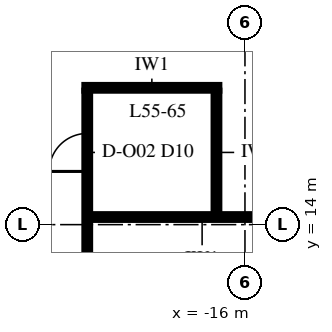
"""IFC4 building model, lengths in metres.
Left out: names, types, materials, properties, quantities, classifications, styles, units other than length and angle.
Written with IfcOpenShell. Run it as: python <this file> out.ifc"""

import sys

from ifc_helpers import new_model, si_unit, direction, frame, frame_2d, origin, place, context, subcontext, project, spatial, rectangle, extrude, element, fill, save


model = new_model("IFC4")
c1 = context("Model", 3, precision=1e-05, world=origin(), true_north=direction((0.0, 1.0)))
c2 = subcontext(c1, "Body", "Model", "MODEL_VIEW")
j1 = project(units=[si_unit("LENGTHUNIT", "METRE"), si_unit("PLANEANGLEUNIT", "RADIAN")], contexts=[c1])
p1 = place(None, origin())
s1 = spatial("IfcSite", under=j1, at=p1, CompositionType="ELEMENT")
p2 = place(p1, origin())
s2 = spatial("IfcBuilding", under=s1, at=p2, CompositionType="ELEMENT")
p3 = place(p2, frame((0.0, 0.0, 238.0)))
s3 = spatial("IfcBuildingStorey", under=s2, at=p3, CompositionType="ELEMENT", Elevation=238.0)
p4 = place(p3, frame((-20.075, 14.2, 0.0), z_axis=(0.0, 0.0, 1.0), x_axis=(1.0, 0.0, 0.0)))
e1 = element("IfcWall", 1, at=p4, inside=s3, PredefinedType="PARTITIONING", context=c2, shape_type="SweptSolid", body=[
    extrude(rectangle(XDim=5.895, YDim=0.15, at=frame_2d((2.948, 0.0))), origin(), (0.0, 0.0, 1.0), 3.13),
])
p5 = place(p3, frame((-20.225, 17.6, 0.0), z_axis=(0.0, 0.0, 1.0), x_axis=(1.0, 0.0, 0.0)))
e2 = element("IfcWall", 2, at=p5, inside=s3, PredefinedType="PARTITIONING", context=c2, shape_type="SweptSolid", body=[
    extrude(rectangle(XDim=3.55, YDim=0.15, at=frame_2d((1.775, 0.0))), origin(), (0.0, 0.0, 1.0), 3.75),
])
p6 = place(p3, frame((-20.15, 8.275, 0.0), z_axis=(0.0, 0.0, 1.0), x_axis=(0.0, 1.0, 0.0)))
e3 = element("IfcWall", 3, at=p6, inside=s3, PredefinedType="PARTITIONING", context=c2, shape_type="SweptSolid", body=[
    extrude(rectangle(XDim=9.25, YDim=0.15, at=frame_2d((4.625, 0.0))), origin(), (0.0, 0.0, 1.0), 3.13),
])
p7 = place(p6, frame((2.425, 0.0, 0.0)))
e4 = element("IfcOpeningElement", 4, at=p7, cuts=e3, PredefinedType="OPENING", context=c2, shape_type="SweptSolid", body=[
    extrude(rectangle(XDim=1.0, YDim=2.3, at=frame_2d((0.5, 1.15))), frame((0.0, 0.09, 0.0), z_axis=(0.0, -1.0, 0.0), x_axis=(1.0, 0.0, 0.0)), (0.0, 0.0, 1.0), 0.18),
])
p8 = place(p6, frame((7.125, 0.0, 0.0)))
e5 = element("IfcOpeningElement", 5, at=p8, cuts=e3, PredefinedType="OPENING", context=c2, shape_type="SweptSolid", body=[
    extrude(rectangle(XDim=1.0, YDim=2.3, at=frame_2d((0.5, 1.15))), frame((0.0, 0.09, 0.0), z_axis=(0.0, -1.0, 0.0), x_axis=(1.0, 0.0, 0.0)), (0.0, 0.0, 1.0), 0.18),
])
p9 = place(p3, frame((-16.75, 14.275, 0.0), z_axis=(0.0, 0.0, 1.0), x_axis=(0.0, 1.0, 0.0)))
e6 = element("IfcWall", 6, at=p9, inside=s3, PredefinedType="PARTITIONING", context=c2, shape_type="SweptSolid", body=[
    extrude(rectangle(XDim=3.25, YDim=0.15, at=frame_2d((1.625, 0.0))), origin(), (0.0, 0.0, 1.0), 3.13),
])
p10 = place(p8, origin())
e7 = element("IfcDoor", 7, at=p10, inside=s3, OperationType="SINGLE_SWING_LEFT", PredefinedType="DOOR", context=c2, shape_type="SweptSolid", body=[
    extrude(rectangle(XDim=1.0, YDim=2.3, at=frame_2d((0.5, 1.15))), frame((0.0, 0.075, 0.0), z_axis=(0.0, -1.0, 0.0), x_axis=(1.0, 0.0, 0.0)), (0.0, 0.0, 1.0), 0.149),
])
fill(e5, e7)
save(model, sys.argv[1])
